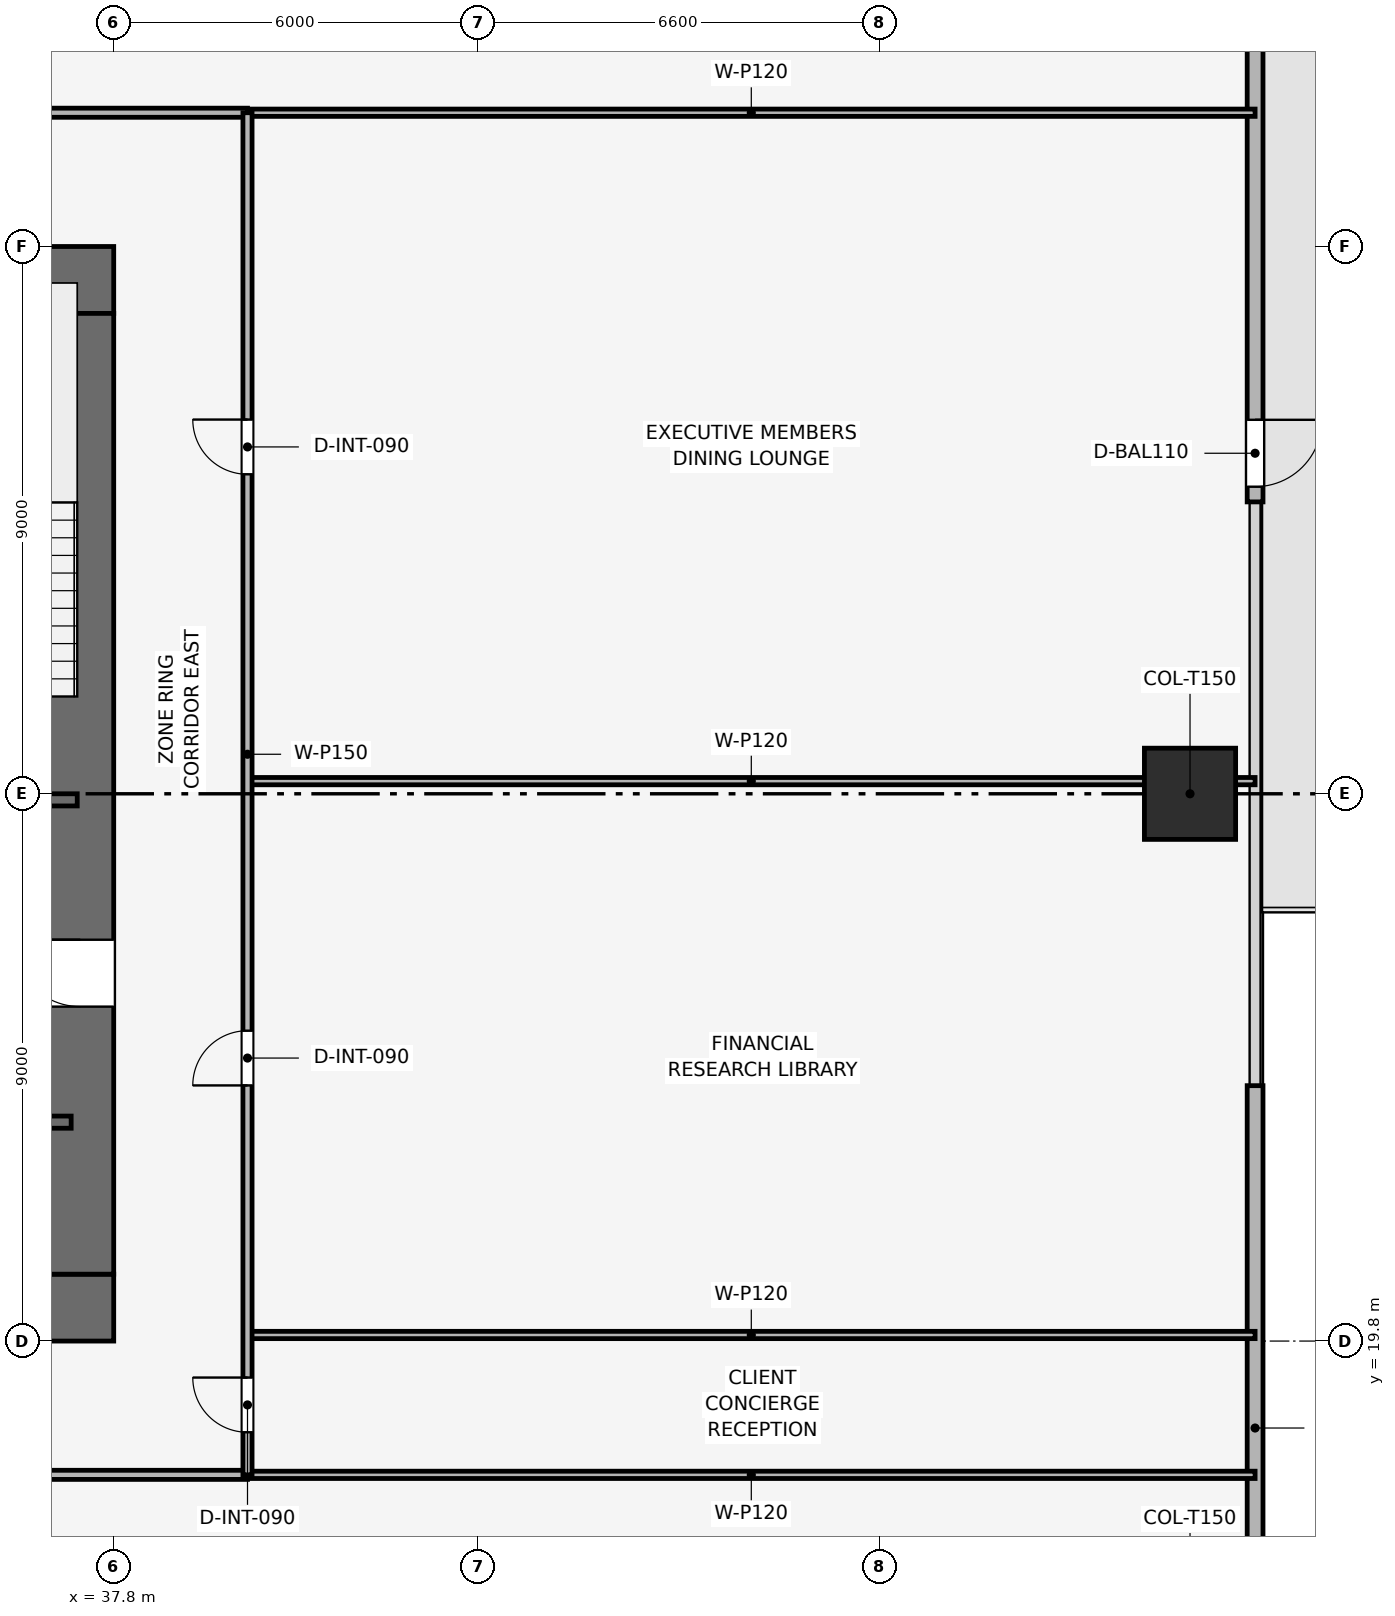
"""IFC4 building model, lengths in metres.
Left out: names, types, materials, properties, quantities, classifications, styles, units other than length and angle.
Written with IfcOpenShell. Run it as: python <this file> out.ifc"""

import sys

from ifc_helpers import new_model, si_unit, direction, frame, frame_2d, origin, origin_2d, place, context, subcontext, project, spatial, rectangle, extrude, element, fill, save


model = new_model("IFC4")
c1 = context("Model", 3, precision=1e-05, world=origin(), true_north=direction((0.0, 1.0)))
c2 = subcontext(c1, "Body", "Model", "MODEL_VIEW")
j1 = project(units=[si_unit("LENGTHUNIT", "METRE"), si_unit("PLANEANGLEUNIT", "RADIAN")], contexts=[c1])
p1 = place(None, origin())
s1 = spatial("IfcSite", under=j1, at=p1, CompositionType="ELEMENT")
p2 = place(p1, origin())
s2 = spatial("IfcBuilding", under=s1, at=p2, CompositionType="ELEMENT")
p3 = place(p2, frame((0.0, 0.0, 84.6)))
s3 = spatial("IfcBuildingStorey", under=s2, at=p3, CompositionType="ELEMENT", Elevation=84.6)
p4 = place(p3, frame((19.8, 20.35, 0.0), z_axis=(0.0, 0.0, 1.0), x_axis=(1.0, 0.0, 0.0)))
e1 = element("IfcWall", 1, at=p4, inside=s3, PredefinedType="SHEAR", context=c2, shape_type="SweptSolid", body=[
    extrude(rectangle(XDim=18.0, YDim=1.1, at=frame_2d((9.0, 0.0))), origin(), (0.0, 0.0, 1.0), 3.9),
])
p5 = place(p4, frame((8.4, 0.0, 0.0)))
e2 = element("IfcOpeningElement", 2, at=p5, cuts=e1, PredefinedType="OPENING", context=c2, shape_type="SweptSolid", body=[
    extrude(rectangle(XDim=1.2, YDim=2.2, at=frame_2d((0.6, 1.1))), frame((0.0, 0.56, 0.0), z_axis=(0.0, -1.0, 0.0), x_axis=(1.0, 0.0, 0.0)), (0.0, 0.0, 1.0), 1.12),
])
p6 = place(p3, frame((19.8, 37.25, 0.0), z_axis=(0.0, 0.0, 1.0), x_axis=(1.0, 0.0, 0.0)))
e3 = element("IfcWall", 3, at=p6, inside=s3, PredefinedType="SHEAR", context=c2, shape_type="SweptSolid", body=[
    extrude(rectangle(XDim=18.0, YDim=1.1, at=frame_2d((9.0, 0.0))), origin(), (0.0, 0.0, 1.0), 3.9),
])
p7 = place(p6, frame((7.05, 0.0, 0.0)))
e4 = element("IfcOpeningElement", 4, at=p7, cuts=e3, PredefinedType="OPENING", context=c2, shape_type="SweptSolid", body=[
    extrude(rectangle(XDim=1.1, YDim=2.15, at=frame_2d((0.55, 1.075))), frame((0.0, 0.56, 0.0), z_axis=(0.0, -1.0, 0.0), x_axis=(1.0, 0.0, 0.0)), (0.0, 0.0, 1.0), 1.12),
])
p8 = place(p3, frame((37.25, 20.9, 0.0), z_axis=(0.0, 0.0, 1.0), x_axis=(0.0, 1.0, 0.0)))
e5 = element("IfcWall", 5, at=p8, inside=s3, PredefinedType="SHEAR", context=c2, shape_type="SweptSolid", body=[
    extrude(rectangle(XDim=15.8, YDim=1.1, at=frame_2d((7.9, 0.0))), origin(), (0.0, 0.0, 1.0), 3.9),
])
p9 = place(p8, frame((4.4, 0.0, 0.0)))
e6 = element("IfcOpeningElement", 6, at=p9, cuts=e5, PredefinedType="OPENING", context=c2, shape_type="SweptSolid", body=[
    extrude(rectangle(XDim=1.1, YDim=2.15, at=frame_2d((0.55, 1.075))), frame((0.0, 0.56, 0.0), z_axis=(0.0, -1.0, 0.0), x_axis=(1.0, 0.0, 0.0)), (0.0, 0.0, 1.0), 1.12),
])
p10 = place(p3, frame((55.5, 28.8, 0.003), z_axis=(0.0, 0.0, 1.0), x_axis=(1.0, 0.0, 0.0)))
e7 = element("IfcColumn", 7, at=p10, inside=s3, PredefinedType="COLUMN", context=c2, shape_type="SweptSolid", body=[
    extrude(rectangle(XDim=1.5, YDim=1.5, at=origin_2d()), origin(), (0.0, 0.0, 1.0), 3.644),
])
p11 = place(p3, frame((56.57, 48.9, 0.0), z_axis=(0.0, 0.0, 1.0), x_axis=(0.0, -1.0, 0.0)))
e8 = element("IfcWall", 8, at=p11, inside=s3, PredefinedType="SOLIDWALL", context=c2, shape_type="SweptSolid", body=[
    extrude(rectangle(XDim=15.3, YDim=0.26, at=frame_2d((7.65, 0.0))), origin(), (0.0, 0.0, 1.0), 3.65),
])
p12 = place(p11, frame((13.95, 0.0, 0.0)))
e9 = element("IfcOpeningElement", 9, at=p12, cuts=e8, PredefinedType="OPENING", context=c2, shape_type="SweptSolid", body=[
    extrude(rectangle(XDim=1.1, YDim=2.2, at=frame_2d((0.55, 1.1))), frame((0.0, 0.14, 0.0), z_axis=(0.0, -1.0, 0.0), x_axis=(1.0, 0.0, 0.0)), (0.0, 0.0, 1.0), 0.28),
])
p13 = place(p3, frame((56.57, 24.0, 0.0), z_axis=(0.0, 0.0, 1.0), x_axis=(0.0, -1.0, 0.0)))
e10 = element("IfcWall", 10, at=p13, inside=s3, PredefinedType="SOLIDWALL", context=c2, shape_type="SweptSolid", body=[
    extrude(rectangle(XDim=15.3, YDim=0.26, at=frame_2d((7.65, 0.0))), origin(), (0.0, 0.0, 1.0), 3.65),
])
p14 = place(p13, frame((11.25, 0.0, 0.9)))
e11 = element("IfcOpeningElement", 11, at=p14, cuts=e10, PredefinedType="OPENING", context=c2, shape_type="SweptSolid", body=[
    extrude(rectangle(XDim=3.8, YDim=1.9, at=frame_2d((1.9, 0.95))), frame((0.0, 0.14, 0.0), z_axis=(0.0, -1.0, 0.0), x_axis=(1.0, 0.0, 0.0)), (0.0, 0.0, 1.0), 0.28),
])
p15 = place(p3, frame((34.05, 28.7, 0.0), z_axis=(0.0, 0.0, 1.0), x_axis=(1.0, 0.0, 0.0)))
e12 = element("IfcWall", 12, at=p15, inside=s3, PredefinedType="SHEAR", context=c2, shape_type="SweptSolid", body=[
    extrude(rectangle(XDim=3.15, YDim=0.2, at=frame_2d((1.575, 0.0))), origin(), (0.0, 0.0, 1.0), 3.65),
])
p16 = place(p15, frame((0.8, 0.0, 0.0)))
e13 = element("IfcOpeningElement", 13, at=p16, cuts=e12, PredefinedType="OPENING", context=c2, shape_type="SweptSolid", body=[
    extrude(rectangle(XDim=1.0, YDim=2.1, at=frame_2d((0.5, 1.05))), frame((0.0, 0.11, 0.0), z_axis=(0.0, -1.0, 0.0), x_axis=(1.0, 0.0, 0.0)), (0.0, 0.0, 1.0), 0.22),
])
p17 = place(p3, frame((34.05, 23.4, 0.0), z_axis=(0.0, 0.0, 1.0), x_axis=(1.0, 0.0, 0.0)))
e14 = element("IfcWall", 14, at=p17, inside=s3, PredefinedType="SHEAR", context=c2, shape_type="SweptSolid", body=[
    extrude(rectangle(XDim=3.05, YDim=0.2, at=frame_2d((1.525, 0.0))), origin(), (0.0, 0.0, 1.0), 3.65),
])
p18 = place(p17, frame((1.2, 0.0, 0.0)))
e15 = element("IfcOpeningElement", 15, at=p18, cuts=e14, PredefinedType="OPENING", context=c2, shape_type="SweptSolid", body=[
    extrude(rectangle(XDim=1.1, YDim=2.15, at=frame_2d((0.55, 1.075))), frame((0.0, 0.11, 0.0), z_axis=(0.0, -1.0, 0.0), x_axis=(1.0, 0.0, 0.0)), (0.0, 0.0, 1.0), 0.22),
])
for number, where, z_axis, x_axis in (
    (16, (40.0, 17.6, 0.0), (0.0, 0.0, 1.0), (1.0, 0.0, 0.0)),
    (17, (40.0, 40.0, 0.0), (0.0, 0.0, 1.0), (1.0, 0.0, 0.0)),
    (18, (40.0, 19.9, 0.0), (0.0, 0.0, 1.0), (1.0, 0.0, 0.0)),
    (19, (40.0, 29.008, 0.0), (0.0, 0.0, 1.0), (1.0, 0.0, 0.0)),
):
    element("IfcWall", number, at=place(p3, frame(where, z_axis=z_axis, x_axis=x_axis)), inside=s3, PredefinedType="PARTITIONING", context=c2, shape_type="SweptSolid", body=[
        extrude(rectangle(XDim=16.57, YDim=0.12, at=frame_2d((8.285, 0.0))), origin(), (0.0, 0.0, 1.0), 2.935),
    ])
p19 = place(p3, frame((17.6, 17.6, 0.0), z_axis=(0.0, 0.0, 1.0), x_axis=(1.0, 0.0, 0.0)))
e20 = element("IfcWall", 20, at=p19, inside=s3, PredefinedType="PARTITIONING", context=c2, shape_type="SweptSolid", body=[
    extrude(rectangle(XDim=22.4, YDim=0.15, at=frame_2d((11.2, 0.0))), origin(), (0.0, 0.0, 1.0), 3.085),
])
p20 = place(p19, frame((10.75, 0.0, 0.0)))
e21 = element("IfcOpeningElement", 21, at=p20, cuts=e20, PredefinedType="OPENING", context=c2, shape_type="SweptSolid", body=[
    extrude(rectangle(XDim=0.9, YDim=2.1, at=frame_2d((0.45, 1.05))), frame((0.0, 0.085, 0.0), z_axis=(0.0, -1.0, 0.0), x_axis=(1.0, 0.0, 0.0)), (0.0, 0.0, 1.0), 0.17),
])
p21 = place(p3, frame((17.6, 40.0, 0.0), z_axis=(0.0, 0.0, 1.0), x_axis=(1.0, 0.0, 0.0)))
e22 = element("IfcWall", 22, at=p21, inside=s3, PredefinedType="PARTITIONING", context=c2, shape_type="SweptSolid", body=[
    extrude(rectangle(XDim=22.4, YDim=0.15, at=frame_2d((11.2, 0.0))), origin(), (0.0, 0.0, 1.0), 3.085),
])
p22 = place(p21, frame((4.349, 0.0, 0.0)))
e23 = element("IfcOpeningElement", 23, at=p22, cuts=e22, PredefinedType="OPENING", context=c2, shape_type="SweptSolid", body=[
    extrude(rectangle(XDim=0.9, YDim=2.1, at=frame_2d((0.45, 1.05))), frame((0.0, 0.085, 0.0), z_axis=(0.0, -1.0, 0.0), x_axis=(1.0, 0.0, 0.0)), (0.0, 0.0, 1.0), 0.17),
])
p23 = place(p21, frame((15.549, 0.0, 0.0)))
e24 = element("IfcOpeningElement", 24, at=p23, cuts=e22, PredefinedType="OPENING", context=c2, shape_type="SweptSolid", body=[
    extrude(rectangle(XDim=0.9, YDim=2.1, at=frame_2d((0.45, 1.05))), frame((0.0, 0.085, 0.0), z_axis=(0.0, -1.0, 0.0), x_axis=(1.0, 0.0, 0.0)), (0.0, 0.0, 1.0), 0.17),
])
p24 = place(p3, frame((40.0, 17.6, 0.0), z_axis=(0.0, 0.0, 1.0), x_axis=(0.0, 1.0, 0.0)))
e25 = element("IfcWall", 25, at=p24, inside=s3, PredefinedType="PARTITIONING", context=c2, shape_type="SweptSolid", body=[
    extrude(rectangle(XDim=22.4, YDim=0.15, at=frame_2d((11.2, 0.0))), origin(), (0.0, 0.0, 1.0), 3.085),
])
p25 = place(p24, frame((0.7, 0.0, 0.0)))
e26 = element("IfcOpeningElement", 26, at=p25, cuts=e25, PredefinedType="OPENING", context=c2, shape_type="SweptSolid", body=[
    extrude(rectangle(XDim=0.9, YDim=2.1, at=frame_2d((0.45, 1.05))), frame((0.0, 0.085, 0.0), z_axis=(0.0, -1.0, 0.0), x_axis=(1.0, 0.0, 0.0)), (0.0, 0.0, 1.0), 0.17),
])
p26 = place(p24, frame((6.404, 0.0, 0.0)))
e27 = element("IfcOpeningElement", 27, at=p26, cuts=e25, PredefinedType="OPENING", context=c2, shape_type="SweptSolid", body=[
    extrude(rectangle(XDim=0.9, YDim=2.1, at=frame_2d((0.45, 1.05))), frame((0.0, 0.085, 0.0), z_axis=(0.0, -1.0, 0.0), x_axis=(1.0, 0.0, 0.0)), (0.0, 0.0, 1.0), 0.17),
])
p27 = place(p24, frame((16.454, 0.0, 0.0)))
e28 = element("IfcOpeningElement", 28, at=p27, cuts=e25, PredefinedType="OPENING", context=c2, shape_type="SweptSolid", body=[
    extrude(rectangle(XDim=0.9, YDim=2.1, at=frame_2d((0.45, 1.05))), frame((0.0, 0.085, 0.0), z_axis=(0.0, -1.0, 0.0), x_axis=(1.0, 0.0, 0.0)), (0.0, 0.0, 1.0), 0.17),
])
p28 = place(p12, origin())
e29 = element("IfcDoor", 29, at=p28, inside=s3, OperationType="SINGLE_SWING_LEFT", PredefinedType="DOOR", context=c2, shape_type="SweptSolid", body=[
    extrude(rectangle(XDim=1.1, YDim=2.2, at=frame_2d((0.55, 1.1))), frame((0.0, 0.025, 0.0), z_axis=(0.0, -1.0, 0.0), x_axis=(1.0, 0.0, 0.0)), (0.0, 0.0, 1.0), 0.05),
])
fill(e9, e29)
p29 = place(p25, origin())
e30 = element("IfcDoor", 30, at=p29, inside=s3, OperationType="SINGLE_SWING_RIGHT", PredefinedType="DOOR", context=c2, shape_type="SweptSolid", body=[
    extrude(rectangle(XDim=0.9, YDim=2.1, at=frame_2d((0.45, 1.05))), frame((0.0, 0.025, 0.0), z_axis=(0.0, -1.0, 0.0), x_axis=(1.0, 0.0, 0.0)), (0.0, 0.0, 1.0), 0.05),
])
fill(e26, e30)
p30 = place(p26, origin())
e31 = element("IfcDoor", 31, at=p30, inside=s3, OperationType="SINGLE_SWING_LEFT", PredefinedType="DOOR", context=c2, shape_type="SweptSolid", body=[
    extrude(rectangle(XDim=0.9, YDim=2.1, at=frame_2d((0.45, 1.05))), frame((0.0, 0.025, 0.0), z_axis=(0.0, -1.0, 0.0), x_axis=(1.0, 0.0, 0.0)), (0.0, 0.0, 1.0), 0.05),
])
fill(e27, e31)
p31 = place(p27, origin())
e32 = element("IfcDoor", 32, at=p31, inside=s3, OperationType="SINGLE_SWING_RIGHT", PredefinedType="DOOR", context=c2, shape_type="SweptSolid", body=[
    extrude(rectangle(XDim=0.9, YDim=2.1, at=frame_2d((0.45, 1.05))), frame((0.0, 0.025, 0.0), z_axis=(0.0, -1.0, 0.0), x_axis=(1.0, 0.0, 0.0)), (0.0, 0.0, 1.0), 0.05),
])
fill(e28, e32)
p32 = place(p9, origin())
e33 = element("IfcDoor", 33, at=p32, inside=s3, OperationType="SINGLE_SWING_RIGHT", PredefinedType="DOOR", context=c2, shape_type="SweptSolid", body=[
    extrude(rectangle(XDim=1.1, YDim=2.15, at=frame_2d((0.55, 1.075))), frame((0.0, 0.025, 0.0), z_axis=(0.0, -1.0, 0.0), x_axis=(1.0, 0.0, 0.0)), (0.0, 0.0, 1.0), 0.05),
])
fill(e6, e33)
save(model, sys.argv[1])
